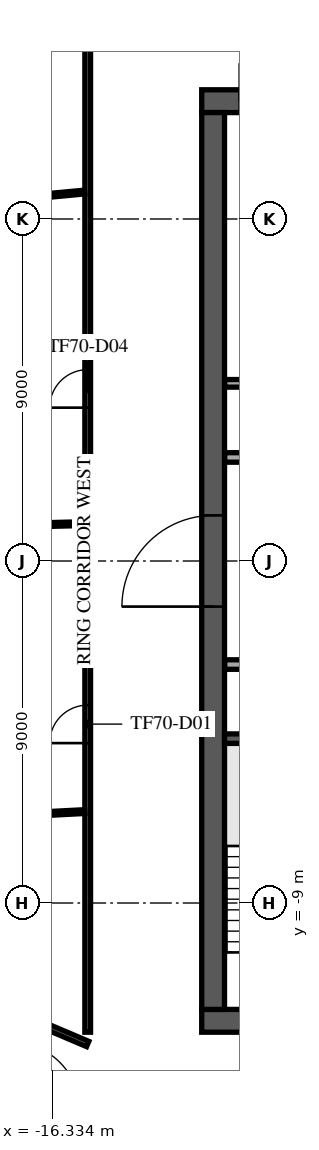
"""IFC4 building model, lengths in metres.
Left out: names, types, materials, properties, quantities, classifications, styles, units other than length and angle.
Written with IfcOpenShell. Run it as: python <this file> out.ifc"""

import sys

from ifc_helpers import new_model, si_unit, direction, frame, frame_2d, origin, place, context, subcontext, project, spatial, rectangle, extrude, element, fill, save


model = new_model("IFC4")
c1 = context("Model", 3, precision=1e-05, world=origin(), true_north=direction((0.0, 1.0)))
c2 = subcontext(c1, "Body", "Model", "MODEL_VIEW")
j1 = project(units=[si_unit("LENGTHUNIT", "METRE"), si_unit("PLANEANGLEUNIT", "RADIAN")], contexts=[c1])
p1 = place(None, origin())
s1 = spatial("IfcSite", under=j1, at=p1, CompositionType="ELEMENT")
p2 = place(p1, origin())
s2 = spatial("IfcBuilding", under=s1, at=p2, CompositionType="ELEMENT")
p3 = place(p2, frame((0.0, 0.0, 300.5)))
s3 = spatial("IfcBuildingStorey", under=s2, at=p3, CompositionType="ELEMENT", Elevation=300.5)
p4 = place(p3, frame((-12.4, 12.1, 0.0), z_axis=(0.0, 0.0, 1.0), x_axis=(1.0, 0.0, 0.0)))
e1 = element("IfcWall", 1, at=p4, inside=s3, PredefinedType="SHEAR", context=c2, shape_type="SweptSolid", body=[
    extrude(rectangle(XDim=24.8, YDim=0.6, at=frame_2d((12.4, 0.0))), origin(), (0.0, 0.0, 1.0), 3.65),
])
p5 = place(p4, frame((11.2, 0.0, 0.0)))
e2 = element("IfcOpeningElement", 2, at=p5, cuts=e1, PredefinedType="OPENING", context=c2, shape_type="SweptSolid", body=[
    extrude(rectangle(XDim=2.4, YDim=2.4, at=frame_2d((1.2, 1.2))), frame((0.0, 0.31, 0.0), z_axis=(0.0, -1.0, 0.0), x_axis=(1.0, 0.0, 0.0)), (0.0, 0.0, 1.0), 0.62),
])
p6 = place(p4, frame((22.025, 0.0, 0.0)))
e3 = element("IfcOpeningElement", 3, at=p6, cuts=e1, PredefinedType="OPENING", context=c2, shape_type="SweptSolid", body=[
    extrude(rectangle(XDim=1.2, YDim=2.1, at=frame_2d((0.6, 1.05))), frame((0.0, 0.31, 0.0), z_axis=(0.0, -1.0, 0.0), x_axis=(1.0, 0.0, 0.0)), (0.0, 0.0, 1.0), 0.62),
])
p7 = place(p4, frame((1.0, 0.0, 0.0)))
e4 = element("IfcOpeningElement", 4, at=p7, cuts=e1, PredefinedType="OPENING", context=c2, shape_type="SweptSolid", body=[
    extrude(rectangle(XDim=1.0, YDim=2.1, at=frame_2d((0.5, 1.05))), frame((0.0, 0.31, 0.0), z_axis=(0.0, -1.0, 0.0), x_axis=(1.0, 0.0, 0.0)), (0.0, 0.0, 1.0), 0.62),
])
p8 = place(p3, frame((-12.4, -12.1, 0.0), z_axis=(0.0, 0.0, 1.0), x_axis=(1.0, 0.0, 0.0)))
e5 = element("IfcWall", 5, at=p8, inside=s3, PredefinedType="SHEAR", context=c2, shape_type="SweptSolid", body=[
    extrude(rectangle(XDim=24.8, YDim=0.6, at=frame_2d((12.4, 0.0))), origin(), (0.0, 0.0, 1.0), 3.65),
])
p9 = place(p8, frame((7.3, 0.0, 0.0)))
e6 = element("IfcOpeningElement", 6, at=p9, cuts=e5, PredefinedType="OPENING", context=c2, shape_type="SweptSolid", body=[
    extrude(rectangle(XDim=2.0, YDim=2.1, at=frame_2d((1.0, 1.05))), frame((0.0, 0.31, 0.0), z_axis=(0.0, -1.0, 0.0), x_axis=(1.0, 0.0, 0.0)), (0.0, 0.0, 1.0), 0.62),
])
p10 = place(p8, frame((17.425, 0.0, 0.0)))
e7 = element("IfcOpeningElement", 7, at=p10, cuts=e5, PredefinedType="OPENING", context=c2, shape_type="SweptSolid", body=[
    extrude(rectangle(XDim=1.2, YDim=2.1, at=frame_2d((0.6, 1.05))), frame((0.0, 0.31, 0.0), z_axis=(0.0, -1.0, 0.0), x_axis=(1.0, 0.0, 0.0)), (0.0, 0.0, 1.0), 0.62),
])
p11 = place(p8, frame((1.575, 0.0, 0.0)))
e8 = element("IfcOpeningElement", 8, at=p11, cuts=e5, PredefinedType="OPENING", context=c2, shape_type="SweptSolid", body=[
    extrude(rectangle(XDim=1.2, YDim=2.1, at=frame_2d((0.6, 1.05))), frame((0.0, 0.31, 0.0), z_axis=(0.0, -1.0, 0.0), x_axis=(1.0, 0.0, 0.0)), (0.0, 0.0, 1.0), 0.62),
])
p12 = place(p8, frame((22.025, 0.0, 0.0)))
e9 = element("IfcOpeningElement", 9, at=p12, cuts=e5, PredefinedType="OPENING", context=c2, shape_type="SweptSolid", body=[
    extrude(rectangle(XDim=1.2, YDim=2.1, at=frame_2d((0.6, 1.05))), frame((0.0, 0.31, 0.0), z_axis=(0.0, -1.0, 0.0), x_axis=(1.0, 0.0, 0.0)), (0.0, 0.0, 1.0), 0.62),
])
p13 = place(p3, frame((-12.1, -11.8, 0.0), z_axis=(0.0, 0.0, 1.0), x_axis=(0.0, 1.0, 0.0)))
e10 = element("IfcWall", 10, at=p13, inside=s3, PredefinedType="SHEAR", context=c2, shape_type="SweptSolid", body=[
    extrude(rectangle(XDim=23.6, YDim=0.6, at=frame_2d((11.8, 0.0))), origin(), (0.0, 0.0, 1.0), 3.65),
])
p14 = place(p13, frame((10.6, 0.0, 0.0)))
e11 = element("IfcOpeningElement", 11, at=p14, cuts=e10, PredefinedType="OPENING", context=c2, shape_type="SweptSolid", body=[
    extrude(rectangle(XDim=2.4, YDim=2.4, at=frame_2d((1.2, 1.2))), frame((0.0, 0.31, 0.0), z_axis=(0.0, -1.0, 0.0), x_axis=(1.0, 0.0, 0.0)), (0.0, 0.0, 1.0), 0.62),
])
p15 = place(p3, frame((-8.65, -4.675, 0.0), z_axis=(0.0, 0.0, 1.0), x_axis=(-1.0, 0.0, 0.0)))
e12 = element("IfcWall", 12, at=p15, inside=s3, PredefinedType="SOLIDWALL", context=c2, shape_type="SweptSolid", body=[
    extrude(rectangle(XDim=3.15, YDim=0.25, at=frame_2d((1.575, 0.0))), origin(), (0.0, 0.0, 1.0), 3.65),
])
p16 = place(p3, frame((-11.795, -2.725, 0.0), z_axis=(0.0, 0.0, 1.0), x_axis=(1.0, 0.0, 0.0)))
e13 = element("IfcWall", 13, at=p16, inside=s3, PredefinedType="PARTITIONING", context=c2, shape_type="SweptSolid", body=[
    extrude(rectangle(XDim=14.415, YDim=0.25, at=frame_2d((7.208, 0.0))), origin(), (0.0, 0.0, 1.0), 3.65),
])
p17 = place(p16, frame((1.295, 0.0, 0.0)))
e14 = element("IfcOpeningElement", 14, at=p17, cuts=e13, PredefinedType="OPENING", context=c2, shape_type="SweptSolid", body=[
    extrude(rectangle(XDim=1.0, YDim=2.1, at=frame_2d((0.5, 1.05))), frame((0.0, 0.135, 0.0), z_axis=(0.0, -1.0, 0.0), x_axis=(1.0, 0.0, 0.0)), (0.0, 0.0, 1.0), 0.27),
])
p18 = place(p16, frame((4.42, 0.0, 0.0)))
e15 = element("IfcOpeningElement", 15, at=p18, cuts=e13, PredefinedType="OPENING", context=c2, shape_type="SweptSolid", body=[
    extrude(rectangle(XDim=1.0, YDim=2.1, at=frame_2d((0.5, 1.05))), frame((0.0, 0.135, 0.0), z_axis=(0.0, -1.0, 0.0), x_axis=(1.0, 0.0, 0.0)), (0.0, 0.0, 1.0), 0.27),
])
p19 = place(p16, frame((9.92, 0.0, 0.0)))
e16 = element("IfcOpeningElement", 16, at=p19, cuts=e13, PredefinedType="OPENING", context=c2, shape_type="SweptSolid", body=[
    extrude(rectangle(XDim=1.0, YDim=2.1, at=frame_2d((0.5, 1.05))), frame((0.0, 0.135, 0.0), z_axis=(0.0, -1.0, 0.0), x_axis=(1.0, 0.0, 0.0)), (0.0, 0.0, 1.0), 0.27),
])
p20 = place(p3, frame((-11.795, 2.725, 0.0), z_axis=(0.0, 0.0, 1.0), x_axis=(1.0, 0.0, 0.0)))
e17 = element("IfcWall", 17, at=p20, inside=s3, PredefinedType="PARTITIONING", context=c2, shape_type="SweptSolid", body=[
    extrude(rectangle(XDim=23.59, YDim=0.25, at=frame_2d((11.795, 0.0))), origin(), (0.0, 0.0, 1.0), 3.65),
])
p21 = place(p20, frame((21.345, 0.0, 0.0)))
e18 = element("IfcOpeningElement", 18, at=p21, cuts=e17, PredefinedType="OPENING", context=c2, shape_type="SweptSolid", body=[
    extrude(rectangle(XDim=0.9, YDim=2.1, at=frame_2d((0.45, 1.05))), frame((0.0, 0.135, 0.0), z_axis=(0.0, -1.0, 0.0), x_axis=(1.0, 0.0, 0.0)), (0.0, 0.0, 1.0), 0.27),
])
p22 = place(p20, frame((1.345, 0.0, 0.0)))
e19 = element("IfcOpeningElement", 19, at=p22, cuts=e17, PredefinedType="OPENING", context=c2, shape_type="SweptSolid", body=[
    extrude(rectangle(XDim=0.9, YDim=2.1, at=frame_2d((0.45, 1.05))), frame((0.0, 0.135, 0.0), z_axis=(0.0, -1.0, 0.0), x_axis=(1.0, 0.0, 0.0)), (0.0, 0.0, 1.0), 0.27),
])
p23 = place(p20, frame((4.42, 0.0, 0.0)))
e20 = element("IfcOpeningElement", 20, at=p23, cuts=e17, PredefinedType="OPENING", context=c2, shape_type="SweptSolid", body=[
    extrude(rectangle(XDim=1.0, YDim=2.1, at=frame_2d((0.5, 1.05))), frame((0.0, 0.135, 0.0), z_axis=(0.0, -1.0, 0.0), x_axis=(1.0, 0.0, 0.0)), (0.0, 0.0, 1.0), 0.27),
])
p24 = place(p20, frame((9.82, 0.0, 0.0)))
e21 = element("IfcOpeningElement", 21, at=p24, cuts=e17, PredefinedType="OPENING", context=c2, shape_type="SweptSolid", body=[
    extrude(rectangle(XDim=1.2, YDim=2.1, at=frame_2d((0.6, 1.05))), frame((0.0, 0.135, 0.0), z_axis=(0.0, -1.0, 0.0), x_axis=(1.0, 0.0, 0.0)), (0.0, 0.0, 1.0), 0.27),
])
p25 = place(p3, frame((-11.795, 4.675, 0.0), z_axis=(0.0, 0.0, 1.0), x_axis=(1.0, 0.0, 0.0)))
e22 = element("IfcWall", 22, at=p25, inside=s3, PredefinedType="PARTITIONING", context=c2, shape_type="SweptSolid", body=[
    extrude(rectangle(XDim=3.645, YDim=0.2, at=frame_2d((1.823, 0.0))), origin(), (0.0, 0.0, 1.0), 3.65),
])
p26 = place(p3, frame((-15.005, 32.985, 0.0), z_axis=(0.0, 0.0, 1.0), x_axis=(-0.39073034436, -0.920505186295, 0.0)))
e23 = element("IfcWall", 23, at=p26, inside=s3, PredefinedType="STANDARD", context=c2, shape_type="SweptSolid", body=[
    extrude(rectangle(XDim=48.49, YDim=0.6, at=frame_2d((24.245, 0.0))), origin(), (0.0, 0.0, 1.0), 3.65),
])
p27 = place(p26, frame((1.204, 0.0, 0.9)))
e24 = element("IfcOpeningElement", 24, at=p27, cuts=e23, PredefinedType="OPENING", context=c2, shape_type="SweptSolid", body=[
    extrude(rectangle(XDim=2.0, YDim=2.1, at=frame_2d((1.0, 1.05))), frame((0.0, 0.31, 0.0), z_axis=(0.0, -1.0, 0.0), x_axis=(1.0, 0.0, 0.0)), (0.0, 0.0, 1.0), 0.62),
])
p28 = place(p26, frame((5.612, 0.0, 0.9)))
e25 = element("IfcOpeningElement", 25, at=p28, cuts=e23, PredefinedType="OPENING", context=c2, shape_type="SweptSolid", body=[
    extrude(rectangle(XDim=2.0, YDim=2.1, at=frame_2d((1.0, 1.05))), frame((0.0, 0.31, 0.0), z_axis=(0.0, -1.0, 0.0), x_axis=(1.0, 0.0, 0.0)), (0.0, 0.0, 1.0), 0.62),
])
p29 = place(p26, frame((10.021, 0.0, 0.9)))
e26 = element("IfcOpeningElement", 26, at=p29, cuts=e23, PredefinedType="OPENING", context=c2, shape_type="SweptSolid", body=[
    extrude(rectangle(XDim=2.0, YDim=2.1, at=frame_2d((1.0, 1.05))), frame((0.0, 0.31, 0.0), z_axis=(0.0, -1.0, 0.0), x_axis=(1.0, 0.0, 0.0)), (0.0, 0.0, 1.0), 0.62),
])
p30 = place(p26, frame((14.428, 0.0, 0.9)))
e27 = element("IfcOpeningElement", 27, at=p30, cuts=e23, PredefinedType="OPENING", context=c2, shape_type="SweptSolid", body=[
    extrude(rectangle(XDim=2.0, YDim=2.1, at=frame_2d((1.0, 1.05))), frame((0.0, 0.31, 0.0), z_axis=(0.0, -1.0, 0.0), x_axis=(1.0, 0.0, 0.0)), (0.0, 0.0, 1.0), 0.62),
])
p31 = place(p26, frame((18.837, 0.0, 0.9)))
e28 = element("IfcOpeningElement", 28, at=p31, cuts=e23, PredefinedType="OPENING", context=c2, shape_type="SweptSolid", body=[
    extrude(rectangle(XDim=2.0, YDim=2.1, at=frame_2d((1.0, 1.05))), frame((0.0, 0.31, 0.0), z_axis=(0.0, -1.0, 0.0), x_axis=(1.0, 0.0, 0.0)), (0.0, 0.0, 1.0), 0.62),
])
p32 = place(p26, frame((23.245, 0.0, 0.9)))
e29 = element("IfcOpeningElement", 29, at=p32, cuts=e23, PredefinedType="OPENING", context=c2, shape_type="SweptSolid", body=[
    extrude(rectangle(XDim=2.0, YDim=2.1, at=frame_2d((1.0, 1.05))), frame((0.0, 0.31, 0.0), z_axis=(0.0, -1.0, 0.0), x_axis=(1.0, 0.0, 0.0)), (0.0, 0.0, 1.0), 0.62),
])
p33 = place(p26, frame((27.653, 0.0, 0.9)))
e30 = element("IfcOpeningElement", 30, at=p33, cuts=e23, PredefinedType="OPENING", context=c2, shape_type="SweptSolid", body=[
    extrude(rectangle(XDim=2.0, YDim=2.1, at=frame_2d((1.0, 1.05))), frame((0.0, 0.31, 0.0), z_axis=(0.0, -1.0, 0.0), x_axis=(1.0, 0.0, 0.0)), (0.0, 0.0, 1.0), 0.62),
])
p34 = place(p26, frame((32.061, 0.0, 0.9)))
e31 = element("IfcOpeningElement", 31, at=p34, cuts=e23, PredefinedType="OPENING", context=c2, shape_type="SweptSolid", body=[
    extrude(rectangle(XDim=2.0, YDim=2.1, at=frame_2d((1.0, 1.05))), frame((0.0, 0.31, 0.0), z_axis=(0.0, -1.0, 0.0), x_axis=(1.0, 0.0, 0.0)), (0.0, 0.0, 1.0), 0.62),
])
p35 = place(p26, frame((36.469, 0.0, 0.9)))
e32 = element("IfcOpeningElement", 32, at=p35, cuts=e23, PredefinedType="OPENING", context=c2, shape_type="SweptSolid", body=[
    extrude(rectangle(XDim=2.0, YDim=2.1, at=frame_2d((1.0, 1.05))), frame((0.0, 0.31, 0.0), z_axis=(0.0, -1.0, 0.0), x_axis=(1.0, 0.0, 0.0)), (0.0, 0.0, 1.0), 0.62),
])
p36 = place(p26, frame((40.877, 0.0, 0.9)))
e33 = element("IfcOpeningElement", 33, at=p36, cuts=e23, PredefinedType="OPENING", context=c2, shape_type="SweptSolid", body=[
    extrude(rectangle(XDim=2.0, YDim=2.1, at=frame_2d((1.0, 1.05))), frame((0.0, 0.31, 0.0), z_axis=(0.0, -1.0, 0.0), x_axis=(1.0, 0.0, 0.0)), (0.0, 0.0, 1.0), 0.62),
])
p37 = place(p26, frame((45.285, 0.0, 0.9)))
e34 = element("IfcOpeningElement", 34, at=p37, cuts=e23, PredefinedType="OPENING", context=c2, shape_type="SweptSolid", body=[
    extrude(rectangle(XDim=2.0, YDim=2.1, at=frame_2d((1.0, 1.05))), frame((0.0, 0.31, 0.0), z_axis=(0.0, -1.0, 0.0), x_axis=(1.0, 0.0, 0.0)), (0.0, 0.0, 1.0), 0.62),
])
p38 = place(p3, frame((-23.896, -11.711, 0.0), z_axis=(0.0, 0.0, 1.0), x_axis=(0.920507643781, -0.390724554821, 0.0)))
e35 = element("IfcWall", 35, at=p38, inside=s3, PredefinedType="PARTITIONING", context=c2, shape_type="SweptSolid", body=[
    extrude(rectangle(XDim=34.917, YDim=0.15, at=frame_2d((17.458, 0.0))), origin(), (0.0, 0.0, 1.0), 3.25),
])
p39 = place(p38, frame((7.05, 0.0, 0.0)))
e36 = element("IfcOpeningElement", 36, at=p39, cuts=e35, PredefinedType="OPENING", context=c2, shape_type="SweptSolid", body=[
    extrude(rectangle(XDim=1.8, YDim=2.1, at=frame_2d((0.9, 1.05))), frame((0.0, 0.085, 0.0), z_axis=(0.0, -1.0, 0.0), x_axis=(1.0, 0.0, 0.0)), (0.0, 0.0, 1.0), 0.17),
])
p40 = place(p38, frame((14.27, 0.0, 0.0)))
e37 = element("IfcOpeningElement", 37, at=p40, cuts=e35, PredefinedType="OPENING", context=c2, shape_type="SweptSolid", body=[
    extrude(rectangle(XDim=1.0, YDim=2.1, at=frame_2d((0.5, 1.05))), frame((0.0, 0.085, 0.0), z_axis=(0.0, -1.0, 0.0), x_axis=(1.0, 0.0, 0.0)), (0.0, 0.0, 1.0), 0.17),
])
p41 = place(p38, frame((29.011, 0.0, 0.0)))
e38 = element("IfcOpeningElement", 38, at=p41, cuts=e35, PredefinedType="OPENING", context=c2, shape_type="SweptSolid", body=[
    extrude(rectangle(XDim=1.0, YDim=2.1, at=frame_2d((0.5, 1.05))), frame((0.0, 0.085, 0.0), z_axis=(0.0, -1.0, 0.0), x_axis=(1.0, 0.0, 0.0)), (0.0, 0.0, 1.0), 0.17),
])
p42 = place(p3, frame((-22.959, -9.501, 0.0), z_axis=(0.0, 0.0, 1.0), x_axis=(0.920500461351, -0.390741475471, 0.0)))
e39 = element("IfcWall", 39, at=p42, inside=s3, PredefinedType="PARTITIONING", context=c2, shape_type="SweptSolid", body=[
    extrude(rectangle(XDim=8.212, YDim=0.15, at=frame_2d((4.106, 0.0))), origin(), (0.0, 0.0, 1.0), 3.25),
])
p43 = place(p42, frame((0.8, 0.0, 0.0)))
e40 = element("IfcOpeningElement", 40, at=p43, cuts=e39, PredefinedType="OPENING", context=c2, shape_type="SweptSolid", body=[
    extrude(rectangle(XDim=1.0, YDim=2.1, at=frame_2d((0.5, 1.05))), frame((0.0, 0.085, 0.0), z_axis=(0.0, -1.0, 0.0), x_axis=(1.0, 0.0, 0.0)), (0.0, 0.0, 1.0), 0.17),
])
p44 = place(p3, frame((-15.4, -12.4, 0.0), z_axis=(0.0, 0.0, 1.0), x_axis=(0.0, 1.0, 0.0)))
e41 = element("IfcWall", 41, at=p44, inside=s3, PredefinedType="PARTITIONING", context=c2, shape_type="SweptSolid", body=[
    extrude(rectangle(XDim=27.8, YDim=0.15, at=frame_2d((13.9, 0.0))), origin(), (0.0, 0.0, 1.0), 3.25),
])
p45 = place(p44, frame((7.608, 0.0, 0.0)))
e42 = element("IfcOpeningElement", 42, at=p45, cuts=e41, PredefinedType="OPENING", context=c2, shape_type="SweptSolid", body=[
    extrude(rectangle(XDim=1.0, YDim=2.1, at=frame_2d((0.5, 1.05))), frame((0.0, 0.085, 0.0), z_axis=(0.0, -1.0, 0.0), x_axis=(1.0, 0.0, 0.0)), (0.0, 0.0, 1.0), 0.17),
])
p46 = place(p44, frame((16.435, 0.0, 0.0)))
e43 = element("IfcOpeningElement", 43, at=p46, cuts=e41, PredefinedType="OPENING", context=c2, shape_type="SweptSolid", body=[
    extrude(rectangle(XDim=1.0, YDim=2.1, at=frame_2d((0.5, 1.05))), frame((0.0, 0.085, 0.0), z_axis=(0.0, -1.0, 0.0), x_axis=(1.0, 0.0, 0.0)), (0.0, 0.0, 1.0), 0.17),
])
p47 = place(p3, frame((-31.836, -7.44, 0.0), z_axis=(0.0, 0.0, 1.0), x_axis=(0.998664003793, 0.05167405082, 0.0)))
e44 = element("IfcWall", 44, at=p47, inside=s3, PredefinedType="PARTITIONING", context=c2, shape_type="SweptSolid", body=[
    extrude(rectangle(XDim=16.38, YDim=0.1, at=frame_2d((8.19, 0.0))), origin(), (0.0, 0.0, 1.0), 3.65),
])
p48 = place(p3, frame((-28.399, 0.657, 0.0), z_axis=(0.0, 0.0, 1.0), x_axis=(0.999679226592, 0.025326743172, 0.0)))
e45 = element("IfcWall", 45, at=p48, inside=s3, PredefinedType="PARTITIONING", context=c2, shape_type="SweptSolid", body=[
    extrude(rectangle(XDim=12.927, YDim=0.1, at=frame_2d((6.463, 0.0))), origin(), (0.0, 0.0, 1.0), 3.25),
])
p49 = place(p3, frame((-24.934, 8.819, 0.0), z_axis=(0.0, 0.0, 1.0), x_axis=(0.995594865602, 0.0937596053, 0.0)))
e46 = element("IfcWall", 46, at=p49, inside=s3, PredefinedType="PARTITIONING", context=c2, shape_type="SweptSolid", body=[
    extrude(rectangle(XDim=9.496, YDim=0.1, at=frame_2d((4.748, 0.0))), origin(), (0.0, 0.0, 1.0), 3.65),
])
p50 = place(p14, origin())
e47 = element("IfcDoor", 47, at=p50, inside=s3, OperationType="SINGLE_SWING_LEFT", PredefinedType="DOOR", context=c2, shape_type="SweptSolid", body=[
    extrude(rectangle(XDim=2.4, YDim=2.4, at=frame_2d((1.2, 1.2))), frame((0.0, 0.025, 0.0), z_axis=(0.0, -1.0, 0.0), x_axis=(1.0, 0.0, 0.0)), (0.0, 0.0, 1.0), 0.05),
])
fill(e11, e47)
p51 = place(p45, origin())
e48 = element("IfcDoor", 48, at=p51, inside=s3, OperationType="SINGLE_SWING_RIGHT", PredefinedType="DOOR", context=c2, shape_type="SweptSolid", body=[
    extrude(rectangle(XDim=1.0, YDim=2.1, at=frame_2d((0.5, 1.05))), frame((0.0, 0.025, 0.0), z_axis=(0.0, -1.0, 0.0), x_axis=(1.0, 0.0, 0.0)), (0.0, 0.0, 1.0), 0.05),
])
fill(e42, e48)
p52 = place(p46, origin())
e49 = element("IfcDoor", 49, at=p52, inside=s3, OperationType="SINGLE_SWING_LEFT", PredefinedType="DOOR", context=c2, shape_type="SweptSolid", body=[
    extrude(rectangle(XDim=1.0, YDim=2.1, at=frame_2d((0.5, 1.05))), frame((0.0, 0.025, 0.0), z_axis=(0.0, -1.0, 0.0), x_axis=(1.0, 0.0, 0.0)), (0.0, 0.0, 1.0), 0.05),
])
fill(e43, e49)
save(model, sys.argv[1])
